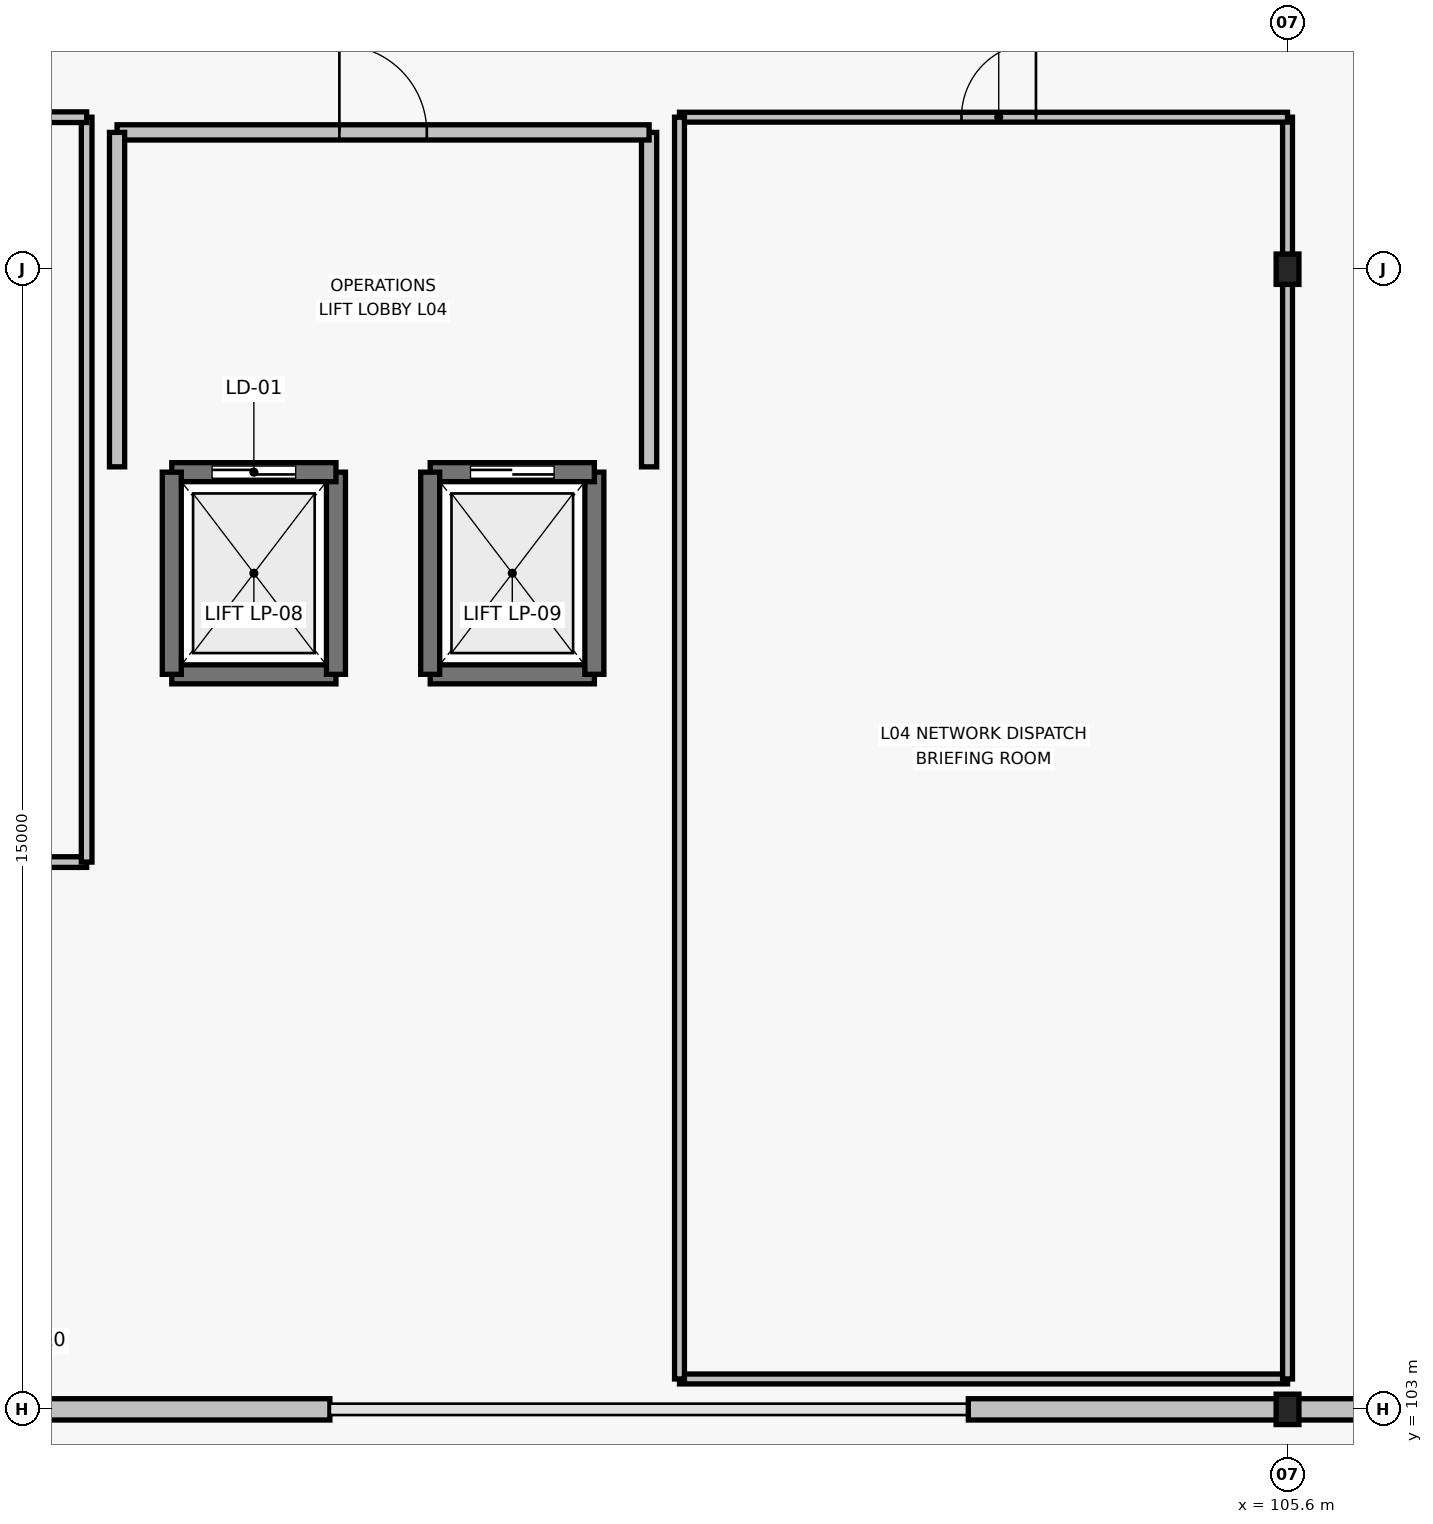
"""IFC4 building model, lengths in metres.
Left out: names, types, materials, properties, quantities, classifications, styles, units other than length and angle.
Written with IfcOpenShell. Run it as: python <this file> out.ifc"""

import sys

from ifc_helpers import new_model, si_unit, direction, frame, frame_2d, origin, origin_2d, place, context, subcontext, project, spatial, rectangle, i_section, extrude, element, fill, save


model = new_model("IFC4")
c1 = context("Model", 3, precision=1e-05, world=origin(), true_north=direction((0.0, 1.0)))
c2 = subcontext(c1, "Body", "Model", "MODEL_VIEW")
j1 = project(units=[si_unit("LENGTHUNIT", "METRE"), si_unit("PLANEANGLEUNIT", "RADIAN")], contexts=[c1])
p1 = place(None, origin())
s1 = spatial("IfcSite", under=j1, at=p1, CompositionType="ELEMENT")
p2 = place(p1, origin())
s2 = spatial("IfcBuilding", under=s1, at=p2, CompositionType="ELEMENT")
p3 = place(p2, frame((0.0, 0.0, 21.0)))
s3 = spatial("IfcBuildingStorey", under=s2, at=p3, CompositionType="ELEMENT", Elevation=21.0)
for number, where, z_axis, x_axis in (
    (1, (105.6, 103.0, 0.0), (0.0, 0.0, 1.0), (1.0, 0.0, 0.0)),
    (2, (105.6, 118.0, 0.0), (0.0, 0.0, 1.0), (1.0, 0.0, 0.0)),
):
    element("IfcColumn", number, at=place(p3, frame(where, z_axis=z_axis, x_axis=x_axis)), inside=s3, PredefinedType="COLUMN", context=c2, shape_type="SweptSolid", body=[
        extrude(i_section(OverallWidth=0.3, OverallDepth=0.4, WebThickness=0.013, FlangeThickness=0.024, FilletRadius=0.027, at=origin_2d()), origin(), (0.0, 0.0, 1.0), 3.9),
    ])
p4 = place(p3, frame((88.8, 103.0, 0.0), z_axis=(0.0, 0.0, 1.0), x_axis=(1.0, 0.0, 0.0)))
e3 = element("IfcWall", 3, at=p4, inside=s3, PredefinedType="STANDARD", context=c2, shape_type="SweptSolid", body=[
    extrude(rectangle(XDim=4.2, YDim=0.28, at=frame_2d((2.1, 0.0))), origin(), (0.0, 0.0, 1.0), 3.315),
])
p5 = place(p3, frame((101.4, 103.0, 0.0), z_axis=(0.0, 0.0, 1.0), x_axis=(1.0, 0.0, 0.0)))
e4 = element("IfcWall", 4, at=p5, inside=s3, PredefinedType="STANDARD", context=c2, shape_type="SweptSolid", body=[
    extrude(rectangle(XDim=4.2, YDim=0.28, at=frame_2d((2.1, 0.0))), origin(), (0.0, 0.0, 1.0), 3.315),
])
p6 = place(p3, frame((105.6, 103.0, 0.0), z_axis=(0.0, 0.0, 1.0), x_axis=(1.0, 0.0, 0.0)))
e5 = element("IfcWall", 5, at=p6, inside=s3, PredefinedType="STANDARD", context=c2, shape_type="SweptSolid", body=[
    extrude(rectangle(XDim=4.2, YDim=0.28, at=frame_2d((2.1, 0.0))), origin(), (0.0, 0.0, 1.0), 3.315),
])
p7 = place(p3, frame((90.92, 112.67, 0.0), z_axis=(0.0, 0.0, 1.0), x_axis=(1.0, 0.0, 0.0)))
e6 = element("IfcWall", 6, at=p7, inside=s3, PredefinedType="SHEAR", context=c2, shape_type="SweptSolid", body=[
    extrude(rectangle(XDim=2.16, YDim=0.25, at=frame_2d((1.08, 0.0))), origin(), (0.0, 0.0, 1.0), 3.71),
])
p8 = place(p3, frame((93.08, 112.67, 0.0), z_axis=(0.0, 0.0, 1.0), x_axis=(0.0, 1.0, 0.0)))
e7 = element("IfcWall", 7, at=p8, inside=s3, PredefinedType="SHEAR", context=c2, shape_type="SweptSolid", body=[
    extrude(rectangle(XDim=2.66, YDim=0.25, at=frame_2d((1.33, 0.0))), origin(), (0.0, 0.0, 1.0), 3.71),
])
p9 = place(p3, frame((93.08, 115.33, 0.0), z_axis=(0.0, 0.0, 1.0), x_axis=(-1.0, 0.0, 0.0)))
e8 = element("IfcWall", 8, at=p9, inside=s3, PredefinedType="SHEAR", context=c2, shape_type="SweptSolid", body=[
    extrude(rectangle(XDim=2.16, YDim=0.25, at=frame_2d((1.08, 0.0))), origin(), (0.0, 0.0, 1.0), 3.71),
])
p10 = place(p9, frame((0.53, 0.0, 0.0)))
e9 = element("IfcOpeningElement", 9, at=p10, cuts=e8, PredefinedType="OPENING", context=c2, shape_type="SweptSolid", body=[
    extrude(rectangle(XDim=1.1, YDim=2.2, at=frame_2d((0.55, 1.1))), frame((0.0, 0.135, 0.0), z_axis=(0.0, -1.0, 0.0), x_axis=(1.0, 0.0, 0.0)), (0.0, 0.0, 1.0), 0.27),
])
p11 = place(p3, frame((90.92, 115.33, 0.0), z_axis=(0.0, 0.0, 1.0), x_axis=(0.0, -1.0, 0.0)))
e10 = element("IfcWall", 10, at=p11, inside=s3, PredefinedType="SHEAR", context=c2, shape_type="SweptSolid", body=[
    extrude(rectangle(XDim=2.66, YDim=0.25, at=frame_2d((1.33, 0.0))), origin(), (0.0, 0.0, 1.0), 3.71),
])
p12 = place(p3, frame((94.32, 112.67, 0.0), z_axis=(0.0, 0.0, 1.0), x_axis=(1.0, 0.0, 0.0)))
e11 = element("IfcWall", 11, at=p12, inside=s3, PredefinedType="SHEAR", context=c2, shape_type="SweptSolid", body=[
    extrude(rectangle(XDim=2.16, YDim=0.25, at=frame_2d((1.08, 0.0))), origin(), (0.0, 0.0, 1.0), 3.71),
])
p13 = place(p3, frame((96.48, 112.67, 0.0), z_axis=(0.0, 0.0, 1.0), x_axis=(0.0, 1.0, 0.0)))
e12 = element("IfcWall", 12, at=p13, inside=s3, PredefinedType="SHEAR", context=c2, shape_type="SweptSolid", body=[
    extrude(rectangle(XDim=2.66, YDim=0.25, at=frame_2d((1.33, 0.0))), origin(), (0.0, 0.0, 1.0), 3.71),
])
p14 = place(p3, frame((96.48, 115.33, 0.0), z_axis=(0.0, 0.0, 1.0), x_axis=(-1.0, 0.0, 0.0)))
e13 = element("IfcWall", 13, at=p14, inside=s3, PredefinedType="SHEAR", context=c2, shape_type="SweptSolid", body=[
    extrude(rectangle(XDim=2.16, YDim=0.25, at=frame_2d((1.08, 0.0))), origin(), (0.0, 0.0, 1.0), 3.71),
])
p15 = place(p14, frame((0.53, 0.0, 0.0)))
e14 = element("IfcOpeningElement", 14, at=p15, cuts=e13, PredefinedType="OPENING", context=c2, shape_type="SweptSolid", body=[
    extrude(rectangle(XDim=1.1, YDim=2.2, at=frame_2d((0.55, 1.1))), frame((0.0, 0.135, 0.0), z_axis=(0.0, -1.0, 0.0), x_axis=(1.0, 0.0, 0.0)), (0.0, 0.0, 1.0), 0.27),
])
p16 = place(p3, frame((94.32, 115.33, 0.0), z_axis=(0.0, 0.0, 1.0), x_axis=(0.0, -1.0, 0.0)))
e15 = element("IfcWall", 15, at=p16, inside=s3, PredefinedType="SHEAR", context=c2, shape_type="SweptSolid", body=[
    extrude(rectangle(XDim=2.66, YDim=0.25, at=frame_2d((1.33, 0.0))), origin(), (0.0, 0.0, 1.0), 3.71),
])
p17 = place(p3, frame((97.2, 115.4, 0.0), z_axis=(0.0, 0.0, 1.0), x_axis=(0.0, 1.0, 0.0)))
e16 = element("IfcWall", 16, at=p17, inside=s3, PredefinedType="PARTITIONING", context=c2, shape_type="SweptSolid", body=[
    extrude(rectangle(XDim=4.4, YDim=0.2, at=frame_2d((2.2, 0.0))), origin(), (0.0, 0.0, 1.0), 3.71),
])
p18 = place(p3, frame((97.2, 119.8, 0.0), z_axis=(0.0, 0.0, 1.0), x_axis=(-1.0, 0.0, 0.0)))
e17 = element("IfcWall", 17, at=p18, inside=s3, PredefinedType="PARTITIONING", context=c2, shape_type="SweptSolid", body=[
    extrude(rectangle(XDim=7.0, YDim=0.2, at=frame_2d((3.5, 0.0))), origin(), (0.0, 0.0, 1.0), 3.71),
])
p19 = place(p18, frame((2.925, 0.0, 0.0)))
e18 = element("IfcOpeningElement", 18, at=p19, cuts=e17, PredefinedType="OPENING", context=c2, shape_type="SweptSolid", body=[
    extrude(rectangle(XDim=1.15, YDim=2.2, at=frame_2d((0.575, 1.1))), frame((0.0, 0.11, 0.0), z_axis=(0.0, -1.0, 0.0), x_axis=(1.0, 0.0, 0.0)), (0.0, 0.0, 1.0), 0.22),
])
p20 = place(p3, frame((90.2, 119.8, 0.0), z_axis=(0.0, 0.0, 1.0), x_axis=(0.0, -1.0, 0.0)))
e19 = element("IfcWall", 19, at=p20, inside=s3, PredefinedType="PARTITIONING", context=c2, shape_type="SweptSolid", body=[
    extrude(rectangle(XDim=4.4, YDim=0.2, at=frame_2d((2.2, 0.0))), origin(), (0.0, 0.0, 1.0), 3.71),
])
p21 = place(p3, frame((82.6, 110.2, 0.0), z_axis=(0.0, 0.0, 1.0), x_axis=(1.0, 0.0, 0.0)))
e20 = element("IfcWall", 20, at=p21, inside=s3, PredefinedType="PARTITIONING", context=c2, shape_type="SweptSolid", body=[
    extrude(rectangle(XDim=7.2, YDim=0.14, at=frame_2d((3.6, 0.0))), origin(), (0.0, 0.0, 1.0), 3.71),
])
p22 = place(p3, frame((89.8, 110.2, 0.0), z_axis=(0.0, 0.0, 1.0), x_axis=(0.0, 1.0, 0.0)))
e21 = element("IfcWall", 21, at=p22, inside=s3, PredefinedType="PARTITIONING", context=c2, shape_type="SweptSolid", body=[
    extrude(rectangle(XDim=9.8, YDim=0.14, at=frame_2d((4.9, 0.0))), origin(), (0.0, 0.0, 1.0), 3.71),
])
p23 = place(p3, frame((89.8, 120.0, 0.0), z_axis=(0.0, 0.0, 1.0), x_axis=(-1.0, 0.0, 0.0)))
e22 = element("IfcWall", 22, at=p23, inside=s3, PredefinedType="PARTITIONING", context=c2, shape_type="SweptSolid", body=[
    extrude(rectangle(XDim=7.2, YDim=0.14, at=frame_2d((3.6, 0.0))), origin(), (0.0, 0.0, 1.0), 3.71),
])
p24 = place(p23, frame((3.26, 0.0, 0.0)))
e23 = element("IfcOpeningElement", 23, at=p24, cuts=e22, PredefinedType="OPENING", context=c2, shape_type="SweptSolid", body=[
    extrude(rectangle(XDim=1.08, YDim=2.1, at=frame_2d((0.54, 1.05))), frame((0.0, 0.08, 0.0), z_axis=(0.0, -1.0, 0.0), x_axis=(1.0, 0.0, 0.0)), (0.0, 0.0, 1.0), 0.16),
])
p25 = place(p3, frame((97.6, 103.4, 0.0), z_axis=(0.0, 0.0, 1.0), x_axis=(1.0, 0.0, 0.0)))
e24 = element("IfcWall", 24, at=p25, inside=s3, PredefinedType="PARTITIONING", context=c2, shape_type="SweptSolid", body=[
    extrude(rectangle(XDim=8.0, YDim=0.13, at=frame_2d((4.0, 0.0))), origin(), (0.0, 0.0, 1.0), 3.315),
])
p26 = place(p3, frame((105.6, 103.4, 0.0), z_axis=(0.0, 0.0, 1.0), x_axis=(0.0, 1.0, 0.0)))
e25 = element("IfcWall", 25, at=p26, inside=s3, PredefinedType="PARTITIONING", context=c2, shape_type="SweptSolid", body=[
    extrude(rectangle(XDim=16.6, YDim=0.13, at=frame_2d((8.3, 0.0))), origin(), (0.0, 0.0, 1.0), 3.205),
])
p27 = place(p3, frame((105.6, 120.0, 0.0), z_axis=(0.0, 0.0, 1.0), x_axis=(-1.0, 0.0, 0.0)))
e26 = element("IfcWall", 26, at=p27, inside=s3, PredefinedType="PARTITIONING", context=c2, shape_type="SweptSolid", body=[
    extrude(rectangle(XDim=8.0, YDim=0.13, at=frame_2d((4.0, 0.0))), origin(), (0.0, 0.0, 1.0), 3.71),
])
p28 = place(p27, frame((4.29, 0.0, 0.0), z_axis=(0.0, 0.0, 1.0), x_axis=(-1.0, 0.0, 0.0)))
e27 = element("IfcOpeningElement", 27, at=p28, cuts=e26, PredefinedType="OPENING", context=c2, shape_type="SweptSolid", body=[
    extrude(rectangle(XDim=0.98, YDim=2.1, at=frame_2d((0.49, 1.05))), frame((0.0, 0.075, 0.0), z_axis=(0.0, -1.0, 0.0), x_axis=(1.0, 0.0, 0.0)), (0.0, 0.0, 1.0), 0.15),
])
p29 = place(p3, frame((97.6, 120.0, 0.0), z_axis=(0.0, 0.0, 1.0), x_axis=(0.0, -1.0, 0.0)))
e28 = element("IfcWall", 28, at=p29, inside=s3, PredefinedType="PARTITIONING", context=c2, shape_type="SweptSolid", body=[
    extrude(rectangle(XDim=16.6, YDim=0.13, at=frame_2d((8.3, 0.0))), origin(), (0.0, 0.0, 1.0), 3.71),
])
p30 = place(p10, origin())
e29 = element("IfcDoor", 29, at=p30, inside=s3, OperationType="SLIDING_TO_RIGHT", PredefinedType="DOOR", context=c2, shape_type="SweptSolid", body=[
    extrude(rectangle(XDim=1.1, YDim=2.2, at=frame_2d((0.55, 1.1))), frame((0.0, 0.025, 0.0), z_axis=(0.0, -1.0, 0.0), x_axis=(1.0, 0.0, 0.0)), (0.0, 0.0, 1.0), 0.05),
])
fill(e9, e29)
p31 = place(p15, origin())
e30 = element("IfcDoor", 30, at=p31, inside=s3, OperationType="SLIDING_TO_RIGHT", PredefinedType="DOOR", context=c2, shape_type="SweptSolid", body=[
    extrude(rectangle(XDim=1.1, YDim=2.2, at=frame_2d((0.55, 1.1))), frame((0.0, 0.025, 0.0), z_axis=(0.0, -1.0, 0.0), x_axis=(1.0, 0.0, 0.0)), (0.0, 0.0, 1.0), 0.05),
])
fill(e14, e30)
p32 = place(p19, origin())
e31 = element("IfcDoor", 31, at=p32, inside=s3, OperationType="SINGLE_SWING_RIGHT", PredefinedType="DOOR", context=c2, shape_type="SweptSolid", body=[
    extrude(rectangle(XDim=1.15, YDim=2.2, at=frame_2d((0.575, 1.1))), frame((0.0, 0.025, 0.0), z_axis=(0.0, -1.0, 0.0), x_axis=(1.0, 0.0, 0.0)), (0.0, 0.0, 1.0), 0.05),
])
fill(e18, e31)
p33 = place(p28, origin())
e32 = element("IfcDoor", 32, at=p33, inside=s3, OperationType="SINGLE_SWING_LEFT", PredefinedType="DOOR", context=c2, shape_type="SweptSolid", body=[
    extrude(rectangle(XDim=0.98, YDim=2.1, at=frame_2d((0.49, 1.05))), frame((0.0, 0.025, 0.0), z_axis=(0.0, -1.0, 0.0), x_axis=(1.0, 0.0, 0.0)), (0.0, 0.0, 1.0), 0.05),
])
fill(e27, e32)
save(model, sys.argv[1])
